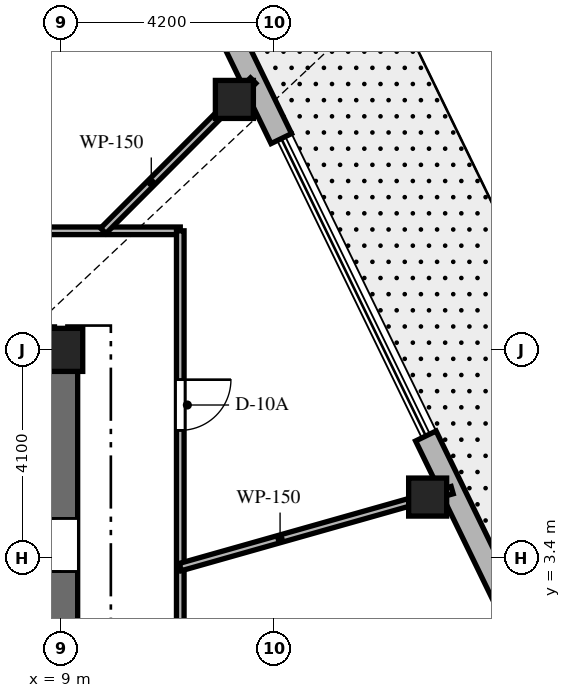
"""IFC4 building model, lengths in metres.
Left out: names, types, materials, properties, quantities, classifications, styles, units other than length and angle.
Written with IfcOpenShell. Run it as: python <this file> out.ifc"""

import sys

from ifc_helpers import new_model, si_unit, direction, frame, frame_2d, origin, origin_2d, place, context, subcontext, project, spatial, rectangle, extrude, element, fill, save


model = new_model("IFC4")
c1 = context("Model", 3, precision=1e-05, world=origin(), true_north=direction((0.0, 1.0)))
c2 = subcontext(c1, "Body", "Model", "MODEL_VIEW")
j1 = project(units=[si_unit("LENGTHUNIT", "METRE"), si_unit("PLANEANGLEUNIT", "RADIAN")], contexts=[c1])
p1 = place(None, origin())
s1 = spatial("IfcSite", under=j1, at=p1, CompositionType="ELEMENT")
p2 = place(p1, origin())
s2 = spatial("IfcBuilding", under=s1, at=p2, CompositionType="ELEMENT")
p3 = place(p2, frame((0.0, 0.0, 305.4)))
s3 = spatial("IfcBuildingStorey", under=s2, at=p3, CompositionType="ELEMENT", Elevation=305.4)
p4 = place(p3, frame((1.85, 7.5, 0.0), z_axis=(0.0, 0.0, 1.0), x_axis=(1.0, 0.0, 0.0)))
e1 = element("IfcWall", 1, at=p4, inside=s3, PredefinedType="SHEAR", context=c2, shape_type="SweptSolid", body=[
    extrude(rectangle(XDim=7.475, YDim=0.65, at=frame_2d((3.737, 0.0))), origin(), (0.0, 0.0, 1.0), 5.0),
])
p5 = place(p3, frame((9.0, -7.175, 0.0), z_axis=(0.0, 0.0, 1.0), x_axis=(0.0, 1.0, 0.0)))
e2 = element("IfcWall", 2, at=p5, inside=s3, PredefinedType="SHEAR", context=c2, shape_type="SweptSolid", body=[
    extrude(rectangle(XDim=14.35, YDim=0.65, at=frame_2d((7.175, 0.0))), origin(), (0.0, 0.0, 1.0), 5.0),
])
p6 = place(p5, frame((10.3, 0.0, 0.0)))
e3 = element("IfcOpeningElement", 3, at=p6, cuts=e2, PredefinedType="OPENING", context=c2, shape_type="SweptSolid", body=[
    extrude(rectangle(XDim=1.05, YDim=2.15, at=frame_2d((0.525, 1.075))), frame((0.0, 0.335, 0.0), z_axis=(0.0, -1.0, 0.0), x_axis=(1.0, 0.0, 0.0)), (0.0, 0.0, 1.0), 0.67),
])
p7 = place(p3, frame((9.0, 7.5, 0.0), z_axis=(0.0, 0.0, 1.0), x_axis=(1.0, 0.0, 0.0)))
e4 = element("IfcColumn", 4, at=p7, inside=s3, PredefinedType="COLUMN", context=c2, shape_type="SweptSolid", body=[
    extrude(rectangle(XDim=0.85, YDim=0.85, at=origin_2d()), origin(), (0.0, 0.0, 1.0), 5.0),
])
for number, where, z_axis, x_axis in (
    (5, (16.232, 4.595, 0.0), (0.0, 0.0, 1.0), (1.0, 0.0, 0.0)),
    (6, (12.418, 12.443, 0.0), (0.0, 0.0, 1.0), (1.0, 0.0, 0.0)),
):
    element("IfcColumn", number, at=place(p3, frame(where, z_axis=z_axis, x_axis=x_axis)), inside=s3, PredefinedType="COLUMN", context=c2, shape_type="SweptSolid", body=[
        extrude(rectangle(XDim=0.75, YDim=0.75, at=origin_2d()), origin(), (0.0, 0.0, 1.0), 5.0),
    ])
p8 = place(p3, frame((17.942, 2.208, 0.0), z_axis=(0.0, 0.0, 1.0), x_axis=(-0.437062225544, 0.899431270861, 0.0)))
e7 = element("IfcWall", 7, at=p8, inside=s3, PredefinedType="SOLIDWALL", context=c2, shape_type="SweptSolid", body=[
    extrude(rectangle(XDim=3.994, YDim=0.45, at=frame_2d((1.997, 0.0))), origin(), (0.0, 0.0, 1.0), 4.68),
])
p9 = place(p3, frame((13.344, 11.67, 0.0), z_axis=(0.0, 0.0, 1.0), x_axis=(-0.437044105444, 0.899440075768, 0.0)))
e8 = element("IfcWall", 8, at=p9, inside=s3, PredefinedType="SOLIDWALL", context=c2, shape_type="SweptSolid", body=[
    extrude(rectangle(XDim=3.987, YDim=0.45, at=frame_2d((1.993, 0.0))), origin(), (0.0, 0.0, 1.0), 4.68),
])
p10 = place(p3, frame((-11.35, 9.85, 0.0), z_axis=(0.0, 0.0, 1.0), x_axis=(1.0, 0.0, 0.0)))
e9 = element("IfcWall", 9, at=p10, inside=s3, PredefinedType="PARTITIONING", context=c2, shape_type="SweptSolid", body=[
    extrude(rectangle(XDim=22.7, YDim=0.15, at=frame_2d((11.35, 0.0))), origin(), (0.0, 0.0, 1.0), 2.87),
])
p11 = place(p10, frame((17.249, 0.0, 0.0)))
e10 = element("IfcOpeningElement", 10, at=p11, cuts=e9, PredefinedType="OPENING", context=c2, shape_type="SweptSolid", body=[
    extrude(rectangle(XDim=1.0, YDim=2.03, at=frame_2d((0.5, 1.015))), frame((0.0, 0.085, 0.0), z_axis=(0.0, -1.0, 0.0), x_axis=(1.0, 0.0, 0.0)), (0.0, 0.0, 1.0), 0.17),
])
p12 = place(p10, frame((10.441, 0.0, 0.0)))
e11 = element("IfcOpeningElement", 11, at=p12, cuts=e9, PredefinedType="OPENING", context=c2, shape_type="SweptSolid", body=[
    extrude(rectangle(XDim=1.0, YDim=2.03, at=frame_2d((0.5, 1.015))), frame((0.0, 0.085, 0.0), z_axis=(0.0, -1.0, 0.0), x_axis=(1.0, 0.0, 0.0)), (0.0, 0.0, 1.0), 0.17),
])
p13 = place(p10, frame((3.454, 0.0, 0.0)))
e12 = element("IfcOpeningElement", 12, at=p13, cuts=e9, PredefinedType="OPENING", context=c2, shape_type="SweptSolid", body=[
    extrude(rectangle(XDim=1.0, YDim=2.03, at=frame_2d((0.5, 1.015))), frame((0.0, 0.085, 0.0), z_axis=(0.0, -1.0, 0.0), x_axis=(1.0, 0.0, 0.0)), (0.0, 0.0, 1.0), 0.17),
])
p14 = place(p3, frame((11.35, 9.85, 0.0), z_axis=(0.0, 0.0, 1.0), x_axis=(0.0, -1.0, 0.0)))
e13 = element("IfcWall", 13, at=p14, inside=s3, PredefinedType="PARTITIONING", context=c2, shape_type="SweptSolid", body=[
    extrude(rectangle(XDim=19.7, YDim=0.15, at=frame_2d((9.85, 0.0))), origin(), (0.0, 0.0, 1.0), 2.87),
])
p15 = place(p14, frame((2.938, 0.0, 0.0)))
e14 = element("IfcOpeningElement", 14, at=p15, cuts=e13, PredefinedType="OPENING", context=c2, shape_type="SweptSolid", body=[
    extrude(rectangle(XDim=1.0, YDim=2.03, at=frame_2d((0.5, 1.015))), frame((0.0, 0.085, 0.0), z_axis=(0.0, -1.0, 0.0), x_axis=(1.0, 0.0, 0.0)), (0.0, 0.0, 1.0), 0.17),
])
p16 = place(p14, frame((15.219, 0.0, 0.0)))
e15 = element("IfcOpeningElement", 15, at=p16, cuts=e13, PredefinedType="OPENING", context=c2, shape_type="SweptSolid", body=[
    extrude(rectangle(XDim=1.0, YDim=2.03, at=frame_2d((0.5, 1.015))), frame((0.0, 0.085, 0.0), z_axis=(0.0, -1.0, 0.0), x_axis=(1.0, 0.0, 0.0)), (0.0, 0.0, 1.0), 0.17),
])
p17 = place(p14, frame((8.805, 0.0, 0.0)))
e16 = element("IfcOpeningElement", 16, at=p17, cuts=e13, PredefinedType="OPENING", context=c2, shape_type="SweptSolid", body=[
    extrude(rectangle(XDim=1.0, YDim=2.03, at=frame_2d((0.5, 1.015))), frame((0.0, 0.085, 0.0), z_axis=(0.0, -1.0, 0.0), x_axis=(1.0, 0.0, 0.0)), (0.0, 0.0, 1.0), 0.17),
])
p18 = place(p3, frame((11.35, 3.213, 0.0), z_axis=(0.0, 0.0, 1.0), x_axis=(0.962182015747, 0.272407357782, 0.0)))
e17 = element("IfcWall", 17, at=p18, inside=s3, PredefinedType="PARTITIONING", context=c2, shape_type="SweptSolid", body=[
    extrude(rectangle(XDim=5.576, YDim=0.15, at=frame_2d((2.788, 0.0))), origin(), (0.0, 0.0, 1.0), 2.87),
])
p19 = place(p3, frame((9.83, 9.85, 0.0), z_axis=(0.0, 0.0, 1.0), x_axis=(0.706435999186, 0.707776927467, 0.0)))
e18 = element("IfcWall", 18, at=p19, inside=s3, PredefinedType="PARTITIONING", context=c2, shape_type="SweptSolid", body=[
    extrude(rectangle(XDim=4.188, YDim=0.15, at=frame_2d((2.094, 0.0))), origin(), (0.0, 0.0, 1.0), 2.87),
])
p20 = place(p6, origin())
e19 = element("IfcDoor", 19, at=p20, inside=s3, OperationType="SINGLE_SWING_LEFT", PredefinedType="DOOR", context=c2, shape_type="SweptSolid", body=[
    extrude(rectangle(XDim=1.05, YDim=2.15, at=frame_2d((0.525, 1.075))), frame((0.0, 0.025, 0.0), z_axis=(0.0, -1.0, 0.0), x_axis=(1.0, 0.0, 0.0)), (0.0, 0.0, 1.0), 0.05),
])
fill(e3, e19)
p21 = place(p15, origin())
e20 = element("IfcDoor", 20, at=p21, inside=s3, OperationType="SINGLE_SWING_LEFT", PredefinedType="DOOR", context=c2, shape_type="SweptSolid", body=[
    extrude(rectangle(XDim=1.0, YDim=2.03, at=frame_2d((0.5, 1.015))), frame((0.0, 0.025, 0.0), z_axis=(0.0, -1.0, 0.0), x_axis=(1.0, 0.0, 0.0)), (0.0, 0.0, 1.0), 0.05),
])
fill(e14, e20)
save(model, sys.argv[1])
